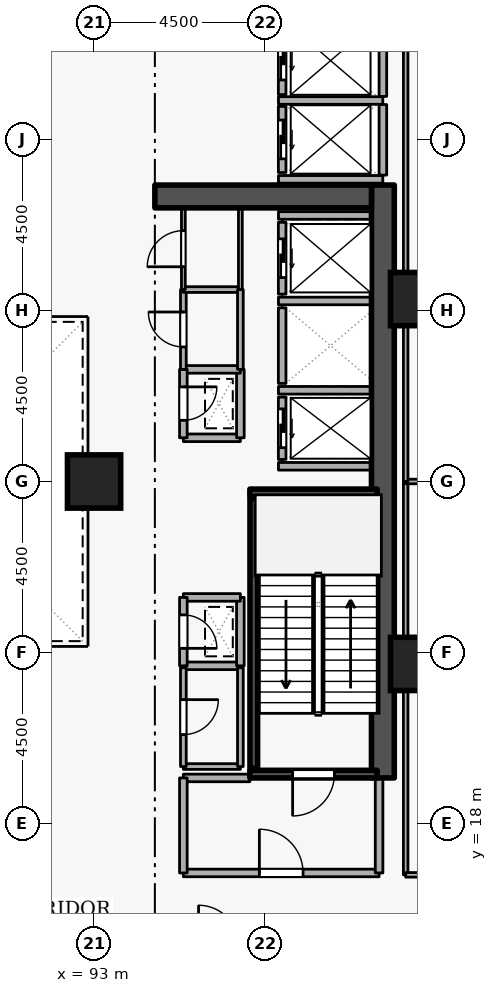
"""IFC4 building model, lengths in metres.
Left out: names, types, materials, properties, quantities, classifications, styles, units other than length and angle.
Written with IfcOpenShell. Run it as: python <this file> out.ifc"""

import sys

from ifc_helpers import new_model, si_unit, direction, frame, frame_2d, origin, origin_2d, place, context, subcontext, project, spatial, rectangle, extrude, element, fill, save


model = new_model("IFC4")
c1 = context("Model", 3, precision=1e-05, world=origin(), true_north=direction((0.0, 1.0)))
c2 = subcontext(c1, "Body", "Model", "MODEL_VIEW")
j1 = project(units=[si_unit("LENGTHUNIT", "METRE"), si_unit("PLANEANGLEUNIT", "RADIAN")], contexts=[c1])
p1 = place(None, origin())
s1 = spatial("IfcSite", under=j1, at=p1, CompositionType="ELEMENT")
p2 = place(p1, origin())
s2 = spatial("IfcBuilding", under=s1, at=p2, CompositionType="ELEMENT")
p3 = place(p2, frame((0.0, 0.0, 18.6)))
s3 = spatial("IfcBuildingStorey", under=s2, at=p3, CompositionType="ELEMENT", Elevation=18.6)
p4 = place(p3, frame((100.6, 19.2, 0.0), z_axis=(0.0, 0.0, 1.0), x_axis=(0.0, 1.0, 0.0)))
e1 = element("IfcWall", 1, at=p4, inside=s3, PredefinedType="SHEAR", context=c2, shape_type="SweptSolid", body=[
    extrude(rectangle(XDim=15.6, YDim=0.6, at=frame_2d((7.8, 0.0))), origin(), (0.0, 0.0, 1.0), 4.5),
])
p5 = place(p3, frame((94.6, 34.5, 0.0), z_axis=(0.0, 0.0, 1.0), x_axis=(1.0, 0.0, 0.0)))
e2 = element("IfcWall", 2, at=p5, inside=s3, PredefinedType="SHEAR", context=c2, shape_type="SweptSolid", body=[
    extrude(rectangle(XDim=5.7, YDim=0.6, at=frame_2d((2.85, 0.0))), origin(), (0.0, 0.0, 1.0), 4.5),
])
for number, where, z_axis, x_axis in (
    (3, (101.5, 22.2, 0.0), (0.0, 0.0, 1.0), (1.0, 0.0, 0.0)),
    (4, (101.5, 31.8, 0.0), (0.0, 0.0, 1.0), (1.0, 0.0, 0.0)),
    (5, (93.0, 27.0, 0.0), (0.0, 0.0, 1.0), (1.0, 0.0, 0.0)),
):
    element("IfcColumn", number, at=place(p3, frame(where, z_axis=z_axis, x_axis=x_axis)), inside=s3, PredefinedType="COLUMN", context=c2, shape_type="SweptSolid", body=[
        extrude(rectangle(XDim=1.4, YDim=1.4, at=origin_2d()), origin(), (0.0, 0.0, 1.0), 4.5),
    ])
p6 = place(p3, frame((97.95, 29.22, 0.0), z_axis=(0.0, 0.0, 1.0), x_axis=(0.0, -1.0, 0.0)))
e6 = element("IfcWall", 6, at=p6, inside=s3, PredefinedType="STANDARD", context=c2, shape_type="SweptSolid", body=[
    extrude(rectangle(XDim=1.64, YDim=0.2, at=frame_2d((0.82, 0.0))), origin(), (0.0, 0.0, 1.0), 4.16),
])
p7 = place(p6, frame((0.31, 0.0, 0.0)))
e7 = element("IfcOpeningElement", 7, at=p7, cuts=e6, PredefinedType="OPENING", context=c2, shape_type="SweptSolid", body=[
    extrude(rectangle(XDim=1.02, YDim=2.06, at=frame_2d((0.51, 1.03))), frame((0.0, 0.11, 0.0), z_axis=(0.0, -1.0, 0.0), x_axis=(1.0, 0.0, 0.0)), (0.0, 0.0, 1.0), 0.22),
])
p8 = place(p3, frame((97.95, 31.57, 0.0), z_axis=(0.0, 0.0, 1.0), x_axis=(0.0, -1.0, 0.0)))
e8 = element("IfcWall", 8, at=p8, inside=s3, PredefinedType="STANDARD", context=c2, shape_type="SweptSolid", body=[
    extrude(rectangle(XDim=1.99, YDim=0.2, at=frame_2d((0.995, 0.0))), origin(), (0.0, 0.0, 1.0), 4.16),
])
p9 = place(p3, frame((97.95, 33.82, 0.0), z_axis=(0.0, 0.0, 1.0), x_axis=(0.0, -1.0, 0.0)))
e9 = element("IfcWall", 9, at=p9, inside=s3, PredefinedType="STANDARD", context=c2, shape_type="SweptSolid", body=[
    extrude(rectangle(XDim=1.89, YDim=0.2, at=frame_2d((0.945, 0.0))), origin(), (0.0, 0.0, 1.0), 4.16),
])
p10 = place(p9, frame((0.435, 0.0, 0.0)))
e10 = element("IfcOpeningElement", 10, at=p10, cuts=e9, PredefinedType="OPENING", context=c2, shape_type="SweptSolid", body=[
    extrude(rectangle(XDim=1.02, YDim=2.06, at=frame_2d((0.51, 1.03))), frame((0.0, 0.11, 0.0), z_axis=(0.0, -1.0, 0.0), x_axis=(1.0, 0.0, 0.0)), (0.0, 0.0, 1.0), 0.22),
])
p11 = place(p3, frame((97.95, 36.87, 0.0), z_axis=(0.0, 0.0, 1.0), x_axis=(0.0, -1.0, 0.0)))
e11 = element("IfcWall", 11, at=p11, inside=s3, PredefinedType="STANDARD", context=c2, shape_type="SweptSolid", body=[
    extrude(rectangle(XDim=1.74, YDim=0.2, at=frame_2d((0.87, 0.0))), origin(), (0.0, 0.0, 1.0), 4.16),
])
p12 = place(p11, frame((0.36, 0.0, 0.0)))
e12 = element("IfcOpeningElement", 12, at=p12, cuts=e11, PredefinedType="OPENING", context=c2, shape_type="SweptSolid", body=[
    extrude(rectangle(XDim=1.02, YDim=2.06, at=frame_2d((0.51, 1.03))), frame((0.0, 0.11, 0.0), z_axis=(0.0, -1.0, 0.0), x_axis=(1.0, 0.0, 0.0)), (0.0, 0.0, 1.0), 0.22),
])
p13 = place(p3, frame((97.95, 38.97, 0.0), z_axis=(0.0, 0.0, 1.0), x_axis=(0.0, -1.0, 0.0)))
e13 = element("IfcWall", 13, at=p13, inside=s3, PredefinedType="STANDARD", context=c2, shape_type="SweptSolid", body=[
    extrude(rectangle(XDim=1.79, YDim=0.2, at=frame_2d((0.895, 0.0))), origin(), (0.0, 0.0, 1.0), 4.16),
])
p14 = place(p13, frame((0.385, 0.0, 0.0)))
e14 = element("IfcOpeningElement", 14, at=p14, cuts=e13, PredefinedType="OPENING", context=c2, shape_type="SweptSolid", body=[
    extrude(rectangle(XDim=1.02, YDim=2.06, at=frame_2d((0.51, 1.03))), frame((0.0, 0.11, 0.0), z_axis=(0.0, -1.0, 0.0), x_axis=(1.0, 0.0, 0.0)), (0.0, 0.0, 1.0), 0.22),
])
for number, where, z_axis, x_axis in (
    (15, (97.852, 29.4, 0.0), (0.0, 0.0, 1.0), (1.0, 0.0, 0.0)),
    (16, (97.852, 27.4, 0.0), (0.0, 0.0, 1.0), (1.0, 0.0, 0.0)),
    (17, (97.852, 31.75, 0.0), (0.0, 0.0, 1.0), (1.0, 0.0, 0.0)),
    (18, (97.852, 34.0, 0.0), (0.0, 0.0, 1.0), (1.0, 0.0, 0.0)),
):
    element("IfcWall", number, at=place(p3, frame(where, z_axis=z_axis, x_axis=x_axis)), inside=s3, PredefinedType="STANDARD", context=c2, shape_type="SweptSolid", body=[
        extrude(rectangle(XDim=2.436, YDim=0.2, at=frame_2d((1.218, 0.0))), origin(), (0.0, 0.0, 1.0), 4.16),
    ])
for number, where, z_axis, x_axis in (
    (19, (97.852, 37.025, 0.0), (0.0, 0.0, 1.0), (1.0, 0.0, 0.0)),
    (20, (97.852, 34.95, 0.0), (0.0, 0.0, 1.0), (1.0, 0.0, 0.0)),
):
    element("IfcWall", number, at=place(p3, frame(where, z_axis=z_axis, x_axis=x_axis)), inside=s3, PredefinedType="STANDARD", context=c2, shape_type="SweptSolid", body=[
        extrude(rectangle(XDim=2.746, YDim=0.2, at=frame_2d((1.373, 0.0))), origin(), (0.0, 0.0, 1.0), 4.16),
    ])
p15 = place(p3, frame((100.6, 35.062, 0.0), z_axis=(0.0, 0.0, 1.0), x_axis=(0.0, 1.0, 0.0)))
e21 = element("IfcWall", 21, at=p15, inside=s3, PredefinedType="STANDARD", context=c2, shape_type="SweptSolid", body=[
    extrude(rectangle(XDim=1.856, YDim=0.2, at=frame_2d((0.928, 0.0))), origin(), (0.0, 0.0, 1.0), 4.16),
])
p16 = place(p3, frame((100.6, 37.132, 0.0), z_axis=(0.0, 0.0, 1.0), x_axis=(0.0, 1.0, 0.0)))
e22 = element("IfcWall", 22, at=p16, inside=s3, PredefinedType="STANDARD", context=c2, shape_type="SweptSolid", body=[
    extrude(rectangle(XDim=2.016, YDim=0.2, at=frame_2d((1.008, 0.0))), origin(), (0.0, 0.0, 1.0), 4.16),
])
p17 = place(p3, frame((100.45, 19.3, 0.0), z_axis=(0.0, 0.0, 1.0), x_axis=(-1.0, 0.0, 0.0)))
e23 = element("IfcWall", 23, at=p17, inside=s3, PredefinedType="SHEAR", context=c2, shape_type="SweptSolid", body=[
    extrude(rectangle(XDim=3.35, YDim=0.2, at=frame_2d((1.675, 0.0))), origin(), (0.0, 0.0, 1.0), 4.5),
])
p18 = place(p17, frame((1.125, 0.0, 0.0)))
e24 = element("IfcOpeningElement", 24, at=p18, cuts=e23, PredefinedType="OPENING", context=c2, shape_type="SweptSolid", body=[
    extrude(rectangle(XDim=1.1, YDim=2.1, at=frame_2d((0.55, 1.05))), frame((0.0, 0.11, 0.0), z_axis=(0.0, -1.0, 0.0), x_axis=(1.0, 0.0, 0.0)), (0.0, 0.0, 1.0), 0.22),
])
p19 = place(p3, frame((97.1, 26.7, 0.0), z_axis=(0.0, 0.0, 1.0), x_axis=(1.0, 0.0, 0.0)))
e25 = element("IfcWall", 25, at=p19, inside=s3, PredefinedType="SHEAR", context=c2, shape_type="SweptSolid", body=[
    extrude(rectangle(XDim=3.35, YDim=0.2, at=frame_2d((1.675, 0.0))), origin(), (0.0, 0.0, 1.0), 4.5),
])
p20 = place(p3, frame((97.203, 26.55, 0.0), z_axis=(0.0, 0.0, 1.0), x_axis=(0.0, -1.0, 0.0)))
e26 = element("IfcWall", 26, at=p20, inside=s3, PredefinedType="SHEAR", context=c2, shape_type="SweptSolid", body=[
    extrude(rectangle(XDim=7.1, YDim=0.2, at=frame_2d((3.55, 0.0))), origin(), (0.0, 0.0, 1.0), 4.5),
])
p21 = place(p3, frame((95.35, 16.7, 0.0), z_axis=(0.0, 0.0, 1.0), x_axis=(1.0, 0.0, 0.0)))
e27 = element("IfcWall", 27, at=p21, inside=s3, PredefinedType="STANDARD", context=c2, shape_type="SweptSolid", body=[
    extrude(rectangle(XDim=5.15, YDim=0.2, at=frame_2d((2.575, 0.0))), origin(), (0.0, 0.0, 1.0), 4.16),
])
p22 = place(p21, frame((2.0, 0.0, 0.0)))
e28 = element("IfcOpeningElement", 28, at=p22, cuts=e27, PredefinedType="OPENING", context=c2, shape_type="SweptSolid", body=[
    extrude(rectangle(XDim=1.15, YDim=2.1, at=frame_2d((0.575, 1.05))), frame((0.0, 0.11, 0.0), z_axis=(0.0, -1.0, 0.0), x_axis=(1.0, 0.0, 0.0)), (0.0, 0.0, 1.0), 0.22),
])
p23 = place(p3, frame((100.5, 16.7, 0.0), z_axis=(0.0, 0.0, 1.0), x_axis=(0.0, 1.0, 0.0)))
e29 = element("IfcWall", 29, at=p23, inside=s3, PredefinedType="STANDARD", context=c2, shape_type="SweptSolid", body=[
    extrude(rectangle(XDim=2.5, YDim=0.2, at=frame_2d((1.25, 0.0))), origin(), (0.0, 0.0, 1.0), 4.16),
])
p24 = place(p3, frame((97.1, 19.2, 0.0), z_axis=(0.0, 0.0, 1.0), x_axis=(-1.0, 0.0, 0.0)))
e30 = element("IfcWall", 30, at=p24, inside=s3, PredefinedType="STANDARD", context=c2, shape_type="SweptSolid", body=[
    extrude(rectangle(XDim=1.75, YDim=0.2, at=frame_2d((0.875, 0.0))), origin(), (0.0, 0.0, 1.0), 3.365),
])
p25 = place(p3, frame((95.35, 19.2, 0.0), z_axis=(0.0, 0.0, 1.0), x_axis=(0.0, -1.0, 0.0)))
e31 = element("IfcWall", 31, at=p25, inside=s3, PredefinedType="STANDARD", context=c2, shape_type="SweptSolid", body=[
    extrude(rectangle(XDim=2.5, YDim=0.2, at=frame_2d((1.25, 0.0))), origin(), (0.0, 0.0, 1.0), 4.16),
])
p26 = place(p3, frame((95.35, 28.15, 0.0), z_axis=(0.0, 0.0, 1.0), x_axis=(1.0, 0.0, 0.0)))
e32 = element("IfcWall", 32, at=p26, inside=s3, PredefinedType="STANDARD", context=c2, shape_type="SweptSolid", body=[
    extrude(rectangle(XDim=1.5, YDim=0.2, at=frame_2d((0.75, 0.0))), origin(), (0.0, 0.0, 1.0), 4.16),
])
p27 = place(p3, frame((96.85, 28.15, 0.0), z_axis=(0.0, 0.0, 1.0), x_axis=(0.0, 1.0, 0.0)))
e33 = element("IfcWall", 33, at=p27, inside=s3, PredefinedType="STANDARD", context=c2, shape_type="SweptSolid", body=[
    extrude(rectangle(XDim=1.8, YDim=0.2, at=frame_2d((0.9, 0.0))), origin(), (0.0, 0.0, 1.0), 4.16),
])
p28 = place(p3, frame((96.85, 29.95, 0.0), z_axis=(0.0, 0.0, 1.0), x_axis=(-1.0, 0.0, 0.0)))
e34 = element("IfcWall", 34, at=p28, inside=s3, PredefinedType="STANDARD", context=c2, shape_type="SweptSolid", body=[
    extrude(rectangle(XDim=1.5, YDim=0.2, at=frame_2d((0.75, 0.0))), origin(), (0.0, 0.0, 1.0), 4.16),
])
p29 = place(p3, frame((95.35, 29.95, 0.0), z_axis=(0.0, 0.0, 1.0), x_axis=(0.0, -1.0, 0.0)))
e35 = element("IfcWall", 35, at=p29, inside=s3, PredefinedType="STANDARD", context=c2, shape_type="SweptSolid", body=[
    extrude(rectangle(XDim=1.8, YDim=0.2, at=frame_2d((0.9, 0.0))), origin(), (0.0, 0.0, 1.0), 4.16),
])
p30 = place(p29, frame((0.46, 0.0, 0.0)))
e36 = element("IfcOpeningElement", 36, at=p30, cuts=e35, PredefinedType="OPENING", context=c2, shape_type="SweptSolid", body=[
    extrude(rectangle(XDim=0.88, YDim=2.04, at=frame_2d((0.44, 1.02))), frame((0.0, 0.11, 0.0), z_axis=(0.0, -1.0, 0.0), x_axis=(1.0, 0.0, 0.0)), (0.0, 0.0, 1.0), 0.22),
])
p31 = place(p3, frame((95.35, 22.15, 0.0), z_axis=(0.0, 0.0, 1.0), x_axis=(1.0, 0.0, 0.0)))
e37 = element("IfcWall", 37, at=p31, inside=s3, PredefinedType="STANDARD", context=c2, shape_type="SweptSolid", body=[
    extrude(rectangle(XDim=1.5, YDim=0.2, at=frame_2d((0.75, 0.0))), origin(), (0.0, 0.0, 1.0), 4.16),
])
p32 = place(p3, frame((96.85, 22.15, 0.0), z_axis=(0.0, 0.0, 1.0), x_axis=(0.0, 1.0, 0.0)))
e38 = element("IfcWall", 38, at=p32, inside=s3, PredefinedType="STANDARD", context=c2, shape_type="SweptSolid", body=[
    extrude(rectangle(XDim=1.8, YDim=0.2, at=frame_2d((0.9, 0.0))), origin(), (0.0, 0.0, 1.0), 4.16),
])
p33 = place(p3, frame((96.85, 23.95, 0.0), z_axis=(0.0, 0.0, 1.0), x_axis=(-1.0, 0.0, 0.0)))
e39 = element("IfcWall", 39, at=p33, inside=s3, PredefinedType="STANDARD", context=c2, shape_type="SweptSolid", body=[
    extrude(rectangle(XDim=1.5, YDim=0.2, at=frame_2d((0.75, 0.0))), origin(), (0.0, 0.0, 1.0), 4.16),
])
p34 = place(p3, frame((95.35, 23.95, 0.0), z_axis=(0.0, 0.0, 1.0), x_axis=(0.0, -1.0, 0.0)))
e40 = element("IfcWall", 40, at=p34, inside=s3, PredefinedType="STANDARD", context=c2, shape_type="SweptSolid", body=[
    extrude(rectangle(XDim=1.8, YDim=0.2, at=frame_2d((0.9, 0.0))), origin(), (0.0, 0.0, 1.0), 4.16),
])
p35 = place(p34, frame((0.46, 0.0, 0.0)))
e41 = element("IfcOpeningElement", 41, at=p35, cuts=e40, PredefinedType="OPENING", context=c2, shape_type="SweptSolid", body=[
    extrude(rectangle(XDim=0.88, YDim=2.04, at=frame_2d((0.44, 1.02))), frame((0.0, 0.11, 0.0), z_axis=(0.0, -1.0, 0.0), x_axis=(1.0, 0.0, 0.0)), (0.0, 0.0, 1.0), 0.22),
])
p36 = place(p3, frame((95.35, 19.5, 0.0), z_axis=(0.0, 0.0, 1.0), x_axis=(1.0, 0.0, 0.0)))
e42 = element("IfcWall", 42, at=p36, inside=s3, PredefinedType="PARTITIONING", context=c2, shape_type="SweptSolid", body=[
    extrude(rectangle(XDim=1.5, YDim=0.15, at=frame_2d((0.75, 0.0))), origin(), (0.0, 0.0, 1.0), 3.365),
])
p37 = place(p3, frame((96.85, 19.5, 0.0), z_axis=(0.0, 0.0, 1.0), x_axis=(0.0, 1.0, 0.0)))
e43 = element("IfcWall", 43, at=p37, inside=s3, PredefinedType="PARTITIONING", context=c2, shape_type="SweptSolid", body=[
    extrude(rectangle(XDim=2.6, YDim=0.15, at=frame_2d((1.3, 0.0))), origin(), (0.0, 0.0, 1.0), 4.16),
])
p38 = place(p3, frame((95.35, 22.1, 0.0), z_axis=(0.0, 0.0, 1.0), x_axis=(0.0, -1.0, 0.0)))
e44 = element("IfcWall", 44, at=p38, inside=s3, PredefinedType="PARTITIONING", context=c2, shape_type="SweptSolid", body=[
    extrude(rectangle(XDim=2.6, YDim=0.15, at=frame_2d((1.3, 0.0))), origin(), (0.0, 0.0, 1.0), 4.16),
])
p39 = place(p38, frame((0.84, 0.0, 0.0)))
e45 = element("IfcOpeningElement", 45, at=p39, cuts=e44, PredefinedType="OPENING", context=c2, shape_type="SweptSolid", body=[
    extrude(rectangle(XDim=0.92, YDim=2.08, at=frame_2d((0.46, 1.04))), frame((0.0, 0.085, 0.0), z_axis=(0.0, -1.0, 0.0), x_axis=(1.0, 0.0, 0.0)), (0.0, 0.0, 1.0), 0.17),
])
p40 = place(p3, frame((95.35, 29.95, 0.0), z_axis=(0.0, 0.0, 1.0), x_axis=(0.0, 1.0, 0.0)))
e46 = element("IfcWall", 46, at=p40, inside=s3, PredefinedType="PARTITIONING", context=c2, shape_type="SweptSolid", body=[
    extrude(rectangle(XDim=2.1, YDim=0.15, at=frame_2d((1.05, 0.0))), origin(), (0.0, 0.0, 1.0), 4.16),
])
p41 = place(p40, frame((0.59, 0.0, 0.0)))
e47 = element("IfcOpeningElement", 47, at=p41, cuts=e46, PredefinedType="OPENING", context=c2, shape_type="SweptSolid", body=[
    extrude(rectangle(XDim=0.92, YDim=2.08, at=frame_2d((0.46, 1.04))), frame((0.0, 0.085, 0.0), z_axis=(0.0, -1.0, 0.0), x_axis=(1.0, 0.0, 0.0)), (0.0, 0.0, 1.0), 0.17),
])
p42 = place(p3, frame((95.35, 32.05, 0.0), z_axis=(0.0, 0.0, 1.0), x_axis=(1.0, 0.0, 0.0)))
e48 = element("IfcWall", 48, at=p42, inside=s3, PredefinedType="PARTITIONING", context=c2, shape_type="SweptSolid", body=[
    extrude(rectangle(XDim=1.5, YDim=0.15, at=frame_2d((0.75, 0.0))), origin(), (0.0, 0.0, 1.0), 4.16),
])
p43 = place(p3, frame((96.85, 32.05, 0.0), z_axis=(0.0, 0.0, 1.0), x_axis=(0.0, -1.0, 0.0)))
e49 = element("IfcWall", 49, at=p43, inside=s3, PredefinedType="PARTITIONING", context=c2, shape_type="SweptSolid", body=[
    extrude(rectangle(XDim=2.1, YDim=0.15, at=frame_2d((1.05, 0.0))), origin(), (0.0, 0.0, 1.0), 4.16),
])
p44 = place(p3, frame((95.35, 32.05, 0.0), z_axis=(0.0, 0.0, 1.0), x_axis=(0.0, 1.0, 0.0)))
e50 = element("IfcWall", 50, at=p44, inside=s3, PredefinedType="PARTITIONING", context=c2, shape_type="SweptSolid", body=[
    extrude(rectangle(XDim=2.15, YDim=0.1, at=frame_2d((1.075, 0.0))), origin(), (0.0, 0.0, 1.0), 4.16),
])
p45 = place(p44, frame((0.6, 0.0, 0.0)))
e51 = element("IfcOpeningElement", 51, at=p45, cuts=e50, PredefinedType="OPENING", context=c2, shape_type="SweptSolid", body=[
    extrude(rectangle(XDim=0.95, YDim=2.1, at=frame_2d((0.475, 1.05))), frame((0.0, 0.06, 0.0), z_axis=(0.0, -1.0, 0.0), x_axis=(1.0, 0.0, 0.0)), (0.0, 0.0, 1.0), 0.12),
])
p46 = place(p3, frame((96.85, 34.2, 0.0), z_axis=(0.0, 0.0, 1.0), x_axis=(0.0, -1.0, 0.0)))
e52 = element("IfcWall", 52, at=p46, inside=s3, PredefinedType="PARTITIONING", context=c2, shape_type="SweptSolid", body=[
    extrude(rectangle(XDim=2.15, YDim=0.1, at=frame_2d((1.075, 0.0))), origin(), (0.0, 0.0, 1.0), 4.16),
])
p47 = place(p3, frame((101.2, 16.65, 0.0), z_axis=(0.0, 0.0, 1.0), x_axis=(0.0, 1.0, 0.0)))
e53 = element("IfcWall", 53, at=p47, inside=s3, PredefinedType="PARTITIONING", context=c2, shape_type="SweptSolid", body=[
    extrude(rectangle(XDim=10.35, YDim=0.12, at=frame_2d((5.175, 0.0))), origin(), (0.0, 0.0, 1.0), 4.16),
])
p48 = place(p3, frame((101.2, 27.0, 0.0), z_axis=(0.0, 0.0, 1.0), x_axis=(1.0, 0.0, 0.0)))
e54 = element("IfcWall", 54, at=p48, inside=s3, PredefinedType="PARTITIONING", context=c2, shape_type="SweptSolid", body=[
    extrude(rectangle(XDim=4.6, YDim=0.12, at=frame_2d((2.3, 0.0))), origin(), (0.0, 0.0, 1.0), 4.16),
])
p49 = place(p3, frame((110.7, 16.65, 0.0), z_axis=(0.0, 0.0, 1.0), x_axis=(-1.0, 0.0, 0.0)))
e55 = element("IfcWall", 55, at=p49, inside=s3, PredefinedType="PARTITIONING", context=c2, shape_type="SweptSolid", body=[
    extrude(rectangle(XDim=9.5, YDim=0.12, at=frame_2d((4.75, 0.0))), origin(), (0.0, 0.0, 1.0), 4.16),
])
p50 = place(p49, frame((4.225, 0.0, 0.0)))
e56 = element("IfcOpeningElement", 56, at=p50, cuts=e55, PredefinedType="OPENING", context=c2, shape_type="SweptSolid", body=[
    extrude(rectangle(XDim=1.05, YDim=2.1, at=frame_2d((0.525, 1.05))), frame((0.0, 0.07, 0.0), z_axis=(0.0, -1.0, 0.0), x_axis=(1.0, 0.0, 0.0)), (0.0, 0.0, 1.0), 0.14),
])
p51 = place(p3, frame((101.2, 27.0, 0.0), z_axis=(0.0, 0.0, 1.0), x_axis=(0.0, 1.0, 0.0)))
e57 = element("IfcWall", 57, at=p51, inside=s3, PredefinedType="PARTITIONING", context=c2, shape_type="SweptSolid", body=[
    extrude(rectangle(XDim=13.8, YDim=0.12, at=frame_2d((6.9, 0.0))), origin(), (0.0, 0.0, 1.0), 4.16),
])
p52 = place(p7, origin())
e58 = element("IfcDoor", 58, at=p52, inside=s3, OperationType="SLIDING_TO_LEFT", PredefinedType="DOOR", context=c2, shape_type="SweptSolid", body=[
    extrude(rectangle(XDim=1.02, YDim=2.06, at=frame_2d((0.51, 1.03))), frame((0.0, 0.025, 0.0), z_axis=(0.0, -1.0, 0.0), x_axis=(1.0, 0.0, 0.0)), (0.0, 0.0, 1.0), 0.05),
])
fill(e7, e58)
p53 = place(p10, origin())
e59 = element("IfcDoor", 59, at=p53, inside=s3, OperationType="SLIDING_TO_LEFT", PredefinedType="DOOR", context=c2, shape_type="SweptSolid", body=[
    extrude(rectangle(XDim=1.02, YDim=2.06, at=frame_2d((0.51, 1.03))), frame((0.0, 0.025, 0.0), z_axis=(0.0, -1.0, 0.0), x_axis=(1.0, 0.0, 0.0)), (0.0, 0.0, 1.0), 0.05),
])
fill(e10, e59)
p54 = place(p12, origin())
e60 = element("IfcDoor", 60, at=p54, inside=s3, OperationType="SLIDING_TO_LEFT", PredefinedType="DOOR", context=c2, shape_type="SweptSolid", body=[
    extrude(rectangle(XDim=1.02, YDim=2.06, at=frame_2d((0.51, 1.03))), frame((0.0, 0.025, 0.0), z_axis=(0.0, -1.0, 0.0), x_axis=(1.0, 0.0, 0.0)), (0.0, 0.0, 1.0), 0.05),
])
fill(e12, e60)
p55 = place(p14, origin())
e61 = element("IfcDoor", 61, at=p55, inside=s3, OperationType="SLIDING_TO_LEFT", PredefinedType="DOOR", context=c2, shape_type="SweptSolid", body=[
    extrude(rectangle(XDim=1.02, YDim=2.06, at=frame_2d((0.51, 1.03))), frame((0.0, 0.025, 0.0), z_axis=(0.0, -1.0, 0.0), x_axis=(1.0, 0.0, 0.0)), (0.0, 0.0, 1.0), 0.05),
])
fill(e14, e61)
p56 = place(p18, origin())
e62 = element("IfcDoor", 62, at=p56, inside=s3, OperationType="SINGLE_SWING_RIGHT", PredefinedType="DOOR", context=c2, shape_type="SweptSolid", body=[
    extrude(rectangle(XDim=1.1, YDim=2.1, at=frame_2d((0.55, 1.05))), frame((0.0, 0.025, 0.0), z_axis=(0.0, -1.0, 0.0), x_axis=(1.0, 0.0, 0.0)), (0.0, 0.0, 1.0), 0.05),
])
fill(e24, e62)
p57 = place(p22, origin())
e63 = element("IfcDoor", 63, at=p57, inside=s3, OperationType="SINGLE_SWING_LEFT", PredefinedType="DOOR", context=c2, shape_type="SweptSolid", body=[
    extrude(rectangle(XDim=1.15, YDim=2.1, at=frame_2d((0.575, 1.05))), frame((0.0, 0.025, 0.0), z_axis=(0.0, -1.0, 0.0), x_axis=(1.0, 0.0, 0.0)), (0.0, 0.0, 1.0), 0.05),
])
fill(e28, e63)
p58 = place(p30, origin())
e64 = element("IfcDoor", 64, at=p58, inside=s3, OperationType="SINGLE_SWING_LEFT", PredefinedType="DOOR", context=c2, shape_type="SweptSolid", body=[
    extrude(rectangle(XDim=0.88, YDim=2.04, at=frame_2d((0.44, 1.02))), frame((0.0, 0.025, 0.0), z_axis=(0.0, -1.0, 0.0), x_axis=(1.0, 0.0, 0.0)), (0.0, 0.0, 1.0), 0.05),
])
fill(e36, e64)
p59 = place(p35, origin())
e65 = element("IfcDoor", 65, at=p59, inside=s3, OperationType="SINGLE_SWING_RIGHT", PredefinedType="DOOR", context=c2, shape_type="SweptSolid", body=[
    extrude(rectangle(XDim=0.88, YDim=2.04, at=frame_2d((0.44, 1.02))), frame((0.0, 0.025, 0.0), z_axis=(0.0, -1.0, 0.0), x_axis=(1.0, 0.0, 0.0)), (0.0, 0.0, 1.0), 0.05),
])
fill(e41, e65)
p60 = place(p39, origin())
e66 = element("IfcDoor", 66, at=p60, inside=s3, OperationType="SINGLE_SWING_LEFT", PredefinedType="DOOR", context=c2, shape_type="SweptSolid", body=[
    extrude(rectangle(XDim=0.92, YDim=2.08, at=frame_2d((0.46, 1.04))), frame((0.0, 0.025, 0.0), z_axis=(0.0, -1.0, 0.0), x_axis=(1.0, 0.0, 0.0)), (0.0, 0.0, 1.0), 0.05),
])
fill(e45, e66)
p61 = place(p41, origin())
e67 = element("IfcDoor", 67, at=p61, inside=s3, OperationType="SINGLE_SWING_RIGHT", PredefinedType="DOOR", context=c2, shape_type="SweptSolid", body=[
    extrude(rectangle(XDim=0.92, YDim=2.08, at=frame_2d((0.46, 1.04))), frame((0.0, 0.025, 0.0), z_axis=(0.0, -1.0, 0.0), x_axis=(1.0, 0.0, 0.0)), (0.0, 0.0, 1.0), 0.05),
])
fill(e47, e67)
p62 = place(p45, origin())
e68 = element("IfcDoor", 68, at=p62, inside=s3, OperationType="SINGLE_SWING_LEFT", PredefinedType="DOOR", context=c2, shape_type="SweptSolid", body=[
    extrude(rectangle(XDim=0.95, YDim=2.1, at=frame_2d((0.475, 1.05))), frame((0.0, 0.025, 0.0), z_axis=(0.0, -1.0, 0.0), x_axis=(1.0, 0.0, 0.0)), (0.0, 0.0, 1.0), 0.05),
])
fill(e51, e68)
save(model, sys.argv[1])
